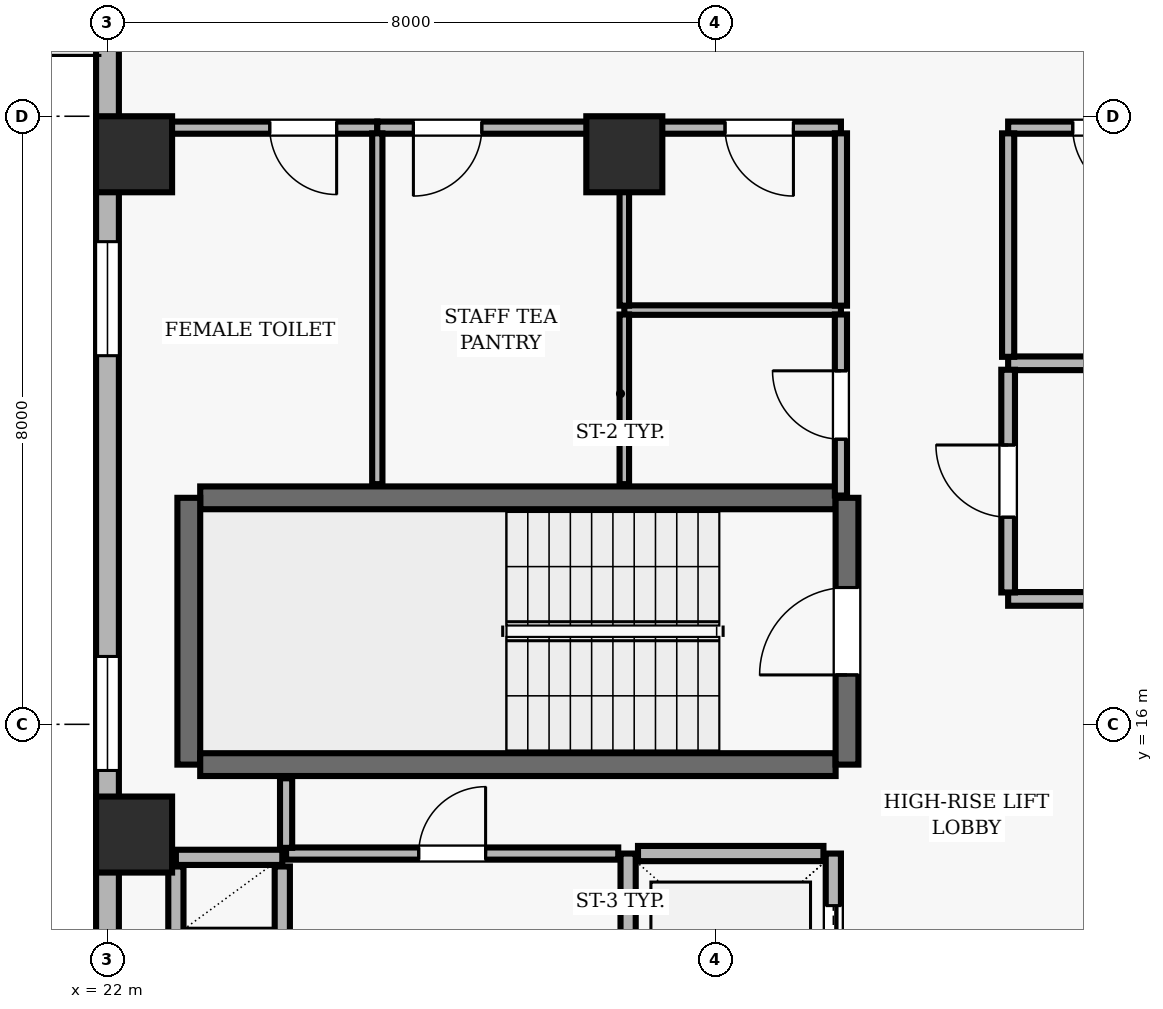
"""IFC4 building model, lengths in metres.
Left out: names, types, materials, properties, quantities, classifications, styles, units other than length and angle.
Written with IfcOpenShell. Run it as: python <this file> out.ifc"""

import sys

from ifc_helpers import new_model, si_unit, direction, frame, frame_2d, origin, origin_2d, place, context, subcontext, project, spatial, rectangle, extrude, element, fill, save


model = new_model("IFC4")
c1 = context("Model", 3, precision=1e-05, world=origin(), true_north=direction((0.0, 1.0)))
c2 = subcontext(c1, "Body", "Model", "MODEL_VIEW")
j1 = project(units=[si_unit("LENGTHUNIT", "METRE"), si_unit("PLANEANGLEUNIT", "RADIAN")], contexts=[c1])
p1 = place(None, origin())
s1 = spatial("IfcSite", under=j1, at=p1, CompositionType="ELEMENT")
p2 = place(p1, origin())
s2 = spatial("IfcBuilding", under=s1, at=p2, CompositionType="ELEMENT")
p3 = place(p2, frame((0.0, 0.0, 203.1)))
s3 = spatial("IfcBuildingStorey", under=s2, at=p3, CompositionType="ELEMENT", Elevation=203.1)
for number, where, z_axis, x_axis in (
    (1, (22.35, 14.55, 0.0), (0.0, 0.0, 1.0), (1.0, 0.0, 0.0)),
    (2, (22.35, 23.5, 0.0), (0.0, 0.0, 1.0), (1.0, 0.0, 0.0)),
    (3, (28.8, 23.5, 0.0), (0.0, 0.0, 1.0), (1.0, 0.0, 0.0)),
):
    element("IfcColumn", number, at=place(p3, frame(where, z_axis=z_axis, x_axis=x_axis)), inside=s3, PredefinedType="COLUMN", context=c2, shape_type="SweptSolid", body=[
        extrude(rectangle(XDim=1.0, YDim=1.0, at=origin_2d()), origin(), (0.0, 0.0, 1.0), 3.9),
    ])
p4 = place(p3, frame((22.0, 40.7, 0.0), z_axis=(0.0, 0.0, 1.0), x_axis=(0.0, -1.0, 0.0)))
e4 = element("IfcWall", 4, at=p4, inside=s3, PredefinedType="SOLIDWALL", context=c2, shape_type="SweptSolid", body=[
    extrude(rectangle(XDim=38.2, YDim=0.3, at=frame_2d((19.1, 0.0))), origin(), (0.0, 0.0, 1.0), 3.69),
])
p5 = place(p4, frame((7.8, 0.0, 0.0)))
e5 = element("IfcOpeningElement", 5, at=p5, cuts=e4, PredefinedType="OPENING", context=c2, shape_type="SweptSolid", body=[
    extrude(rectangle(XDim=1.0, YDim=2.2, at=frame_2d((0.5, 1.1))), frame((0.0, 0.16, 0.0), z_axis=(0.0, -1.0, 0.0), x_axis=(1.0, 0.0, 0.0)), (0.0, 0.0, 1.0), 0.32),
])
p6 = place(p4, frame((1.979, 0.0, 0.9)))
e6 = element("IfcOpeningElement", 6, at=p6, cuts=e4, PredefinedType="OPENING", context=c2, shape_type="SweptSolid", body=[
    extrude(rectangle(XDim=1.5, YDim=1.6, at=frame_2d((0.75, 0.8))), frame((0.0, 0.16, 0.0), z_axis=(0.0, -1.0, 0.0), x_axis=(1.0, 0.0, 0.0)), (0.0, 0.0, 1.0), 0.32),
])
p7 = place(p4, frame((12.443, 0.0, 0.9)))
e7 = element("IfcOpeningElement", 7, at=p7, cuts=e4, PredefinedType="OPENING", context=c2, shape_type="SweptSolid", body=[
    extrude(rectangle(XDim=1.5, YDim=1.6, at=frame_2d((0.75, 0.8))), frame((0.0, 0.16, 0.0), z_axis=(0.0, -1.0, 0.0), x_axis=(1.0, 0.0, 0.0)), (0.0, 0.0, 1.0), 0.32),
])
p8 = place(p4, frame((18.35, 0.0, 0.9)))
e8 = element("IfcOpeningElement", 8, at=p8, cuts=e4, PredefinedType="OPENING", context=c2, shape_type="SweptSolid", body=[
    extrude(rectangle(XDim=1.5, YDim=1.6, at=frame_2d((0.75, 0.8))), frame((0.0, 0.16, 0.0), z_axis=(0.0, -1.0, 0.0), x_axis=(1.0, 0.0, 0.0)), (0.0, 0.0, 1.0), 0.32),
])
p9 = place(p4, frame((23.807, 0.0, 0.9)))
e9 = element("IfcOpeningElement", 9, at=p9, cuts=e4, PredefinedType="OPENING", context=c2, shape_type="SweptSolid", body=[
    extrude(rectangle(XDim=1.5, YDim=1.6, at=frame_2d((0.75, 0.8))), frame((0.0, 0.16, 0.0), z_axis=(0.0, -1.0, 0.0), x_axis=(1.0, 0.0, 0.0)), (0.0, 0.0, 1.0), 0.32),
])
p10 = place(p4, frame((29.264, 0.0, 0.9)))
e10 = element("IfcOpeningElement", 10, at=p10, cuts=e4, PredefinedType="OPENING", context=c2, shape_type="SweptSolid", body=[
    extrude(rectangle(XDim=1.5, YDim=1.6, at=frame_2d((0.75, 0.8))), frame((0.0, 0.16, 0.0), z_axis=(0.0, -1.0, 0.0), x_axis=(1.0, 0.0, 0.0)), (0.0, 0.0, 1.0), 0.32),
])
p11 = place(p3, frame((31.58, 18.98, 0.0), z_axis=(0.0, 0.0, 1.0), x_axis=(-1.0, 0.0, 0.0)))
e11 = element("IfcWall", 11, at=p11, inside=s3, PredefinedType="SHEAR", context=c2, shape_type="SweptSolid", body=[
    extrude(rectangle(XDim=8.36, YDim=0.3, at=frame_2d((4.18, 0.0))), origin(), (0.0, 0.0, 1.0), 3.69),
])
p12 = place(p3, frame((23.07, 18.98, 0.0), z_axis=(0.0, 0.0, 1.0), x_axis=(0.0, -1.0, 0.0)))
e12 = element("IfcWall", 12, at=p12, inside=s3, PredefinedType="SHEAR", context=c2, shape_type="SweptSolid", body=[
    extrude(rectangle(XDim=3.51, YDim=0.3, at=frame_2d((1.755, 0.0))), origin(), (0.0, 0.0, 1.0), 3.69),
])
p13 = place(p3, frame((23.22, 15.47, 0.0), z_axis=(0.0, 0.0, 1.0), x_axis=(1.0, 0.0, 0.0)))
e13 = element("IfcWall", 13, at=p13, inside=s3, PredefinedType="SHEAR", context=c2, shape_type="SweptSolid", body=[
    extrude(rectangle(XDim=8.36, YDim=0.3, at=frame_2d((4.18, 0.0))), origin(), (0.0, 0.0, 1.0), 3.69),
])
p14 = place(p3, frame((31.73, 15.47, 0.0), z_axis=(0.0, 0.0, 1.0), x_axis=(0.0, 1.0, 0.0)))
e14 = element("IfcWall", 14, at=p14, inside=s3, PredefinedType="SHEAR", context=c2, shape_type="SweptSolid", body=[
    extrude(rectangle(XDim=3.51, YDim=0.3, at=frame_2d((1.755, 0.0))), origin(), (0.0, 0.0, 1.0), 3.69),
])
p15 = place(p14, frame((1.18, 0.0, 0.0)))
e15 = element("IfcOpeningElement", 15, at=p15, cuts=e14, PredefinedType="OPENING", context=c2, shape_type="SweptSolid", body=[
    extrude(rectangle(XDim=1.15, YDim=2.15, at=frame_2d((0.575, 1.075))), frame((0.0, 0.16, 0.0), z_axis=(0.0, -1.0, 0.0), x_axis=(1.0, 0.0, 0.0)), (0.0, 0.0, 1.0), 0.32),
])
p16 = place(p3, frame((28.85, 14.3, 0.0), z_axis=(0.0, 0.0, 1.0), x_axis=(0.0, -1.0, 0.0)))
e16 = element("IfcWall", 16, at=p16, inside=s3, PredefinedType="SOLIDWALL", context=c2, shape_type="SweptSolid", body=[
    extrude(rectangle(XDim=2.37, YDim=0.2, at=frame_2d((1.185, 0.0))), origin(), (0.0, 0.0, 1.0), 3.69),
])
p17 = place(p3, frame((31.55, 11.93, 0.0), z_axis=(0.0, 0.0, 1.0), x_axis=(0.0, 1.0, 0.0)))
e17 = element("IfcWall", 17, at=p17, inside=s3, PredefinedType="SOLIDWALL", context=c2, shape_type="SweptSolid", body=[
    extrude(rectangle(XDim=2.37, YDim=0.2, at=frame_2d((1.185, 0.0))), origin(), (0.0, 0.0, 1.0), 3.69),
])
p18 = place(p17, frame((0.685, 0.0, 0.0)))
e18 = element("IfcOpeningElement", 18, at=p18, cuts=e17, PredefinedType="OPENING", context=c2, shape_type="SweptSolid", body=[
    extrude(rectangle(XDim=1.0, YDim=2.1, at=frame_2d((0.5, 1.05))), frame((0.0, 0.11, 0.0), z_axis=(0.0, -1.0, 0.0), x_axis=(1.0, 0.0, 0.0)), (0.0, 0.0, 1.0), 0.22),
])
p19 = place(p3, frame((31.42, 14.3, 0.0), z_axis=(0.0, 0.0, 1.0), x_axis=(-1.0, 0.0, 0.0)))
e19 = element("IfcWall", 19, at=p19, inside=s3, PredefinedType="SOLIDWALL", context=c2, shape_type="SweptSolid", body=[
    extrude(rectangle(XDim=2.44, YDim=0.2, at=frame_2d((1.22, 0.0))), origin(), (0.0, 0.0, 1.0), 3.69),
])
p20 = place(p3, frame((22.9, 14.25, 0.0), z_axis=(0.0, 0.0, 1.0), x_axis=(1.0, 0.0, 0.0)))
e20 = element("IfcWall", 20, at=p20, inside=s3, PredefinedType="SOLIDWALL", context=c2, shape_type="SweptSolid", body=[
    extrude(rectangle(XDim=1.4, YDim=0.2, at=frame_2d((0.7, 0.0))), origin(), (0.0, 0.0, 1.0), 3.69),
])
for number, where, z_axis, x_axis in (
    (21, (24.3, 12.3, 0.0), (0.0, 0.0, 1.0), (0.0, 1.0, 0.0)),
    (22, (22.9, 12.3, 0.0), (0.0, 0.0, 1.0), (0.0, 1.0, 0.0)),
):
    element("IfcWall", number, at=place(p3, frame(where, z_axis=z_axis, x_axis=x_axis)), inside=s3, PredefinedType="SOLIDWALL", context=c2, shape_type="SweptSolid", body=[
        extrude(rectangle(XDim=1.83, YDim=0.2, at=frame_2d((0.915, 0.0))), origin(), (0.0, 0.0, 1.0), 3.69),
    ])
p21 = place(p3, frame((24.35, 14.3, 0.0), z_axis=(0.0, 0.0, 1.0), x_axis=(1.0, 0.0, 0.0)))
e23 = element("IfcWall", 23, at=p21, inside=s3, PredefinedType="PARTITIONING", context=c2, shape_type="SweptSolid", body=[
    extrude(rectangle(XDim=4.37, YDim=0.16, at=frame_2d((2.185, 0.0))), origin(), (0.0, 0.0, 1.0), 3.69),
])
p22 = place(p21, frame((1.745, 0.0, 0.0)))
e24 = element("IfcOpeningElement", 24, at=p22, cuts=e23, PredefinedType="OPENING", context=c2, shape_type="SweptSolid", body=[
    extrude(rectangle(XDim=0.88, YDim=2.1, at=frame_2d((0.44, 1.05))), frame((0.0, 0.09, 0.0), z_axis=(0.0, -1.0, 0.0), x_axis=(1.0, 0.0, 0.0)), (0.0, 0.0, 1.0), 0.18),
])
p23 = place(p3, frame((25.55, 23.85, 0.0), z_axis=(0.0, 0.0, 1.0), x_axis=(-1.0, 0.0, 0.0)))
e25 = element("IfcWall", 25, at=p23, inside=s3, PredefinedType="PARTITIONING", context=c2, shape_type="SweptSolid", body=[
    extrude(rectangle(XDim=3.35, YDim=0.16, at=frame_2d((1.675, 0.0))), origin(), (0.0, 0.0, 1.0), 3.146),
])
p24 = place(p23, frame((0.535, 0.0, 0.0)))
e26 = element("IfcOpeningElement", 26, at=p24, cuts=e25, PredefinedType="OPENING", context=c2, shape_type="SweptSolid", body=[
    extrude(rectangle(XDim=0.88, YDim=2.1, at=frame_2d((0.44, 1.05))), frame((0.0, 0.09, 0.0), z_axis=(0.0, -1.0, 0.0), x_axis=(1.0, 0.0, 0.0)), (0.0, 0.0, 1.0), 0.18),
])
p25 = place(p3, frame((28.8, 23.85, 0.0), z_axis=(0.0, 0.0, 1.0), x_axis=(-1.0, 0.0, 0.0)))
e27 = element("IfcWall", 27, at=p25, inside=s3, PredefinedType="PARTITIONING", context=c2, shape_type="SweptSolid", body=[
    extrude(rectangle(XDim=3.25, YDim=0.16, at=frame_2d((1.625, 0.0))), origin(), (0.0, 0.0, 1.0), 3.146),
])
p26 = place(p25, frame((1.875, 0.0, 0.0)))
e28 = element("IfcOpeningElement", 28, at=p26, cuts=e27, PredefinedType="OPENING", context=c2, shape_type="SweptSolid", body=[
    extrude(rectangle(XDim=0.9, YDim=2.1, at=frame_2d((0.45, 1.05))), frame((0.0, 0.09, 0.0), z_axis=(0.0, -1.0, 0.0), x_axis=(1.0, 0.0, 0.0)), (0.0, 0.0, 1.0), 0.18),
])
p27 = place(p3, frame((31.65, 21.45, 0.0), z_axis=(0.0, 0.0, 1.0), x_axis=(-1.0, 0.0, 0.0)))
e29 = element("IfcWall", 29, at=p27, inside=s3, PredefinedType="PARTITIONING", context=c2, shape_type="SweptSolid", body=[
    extrude(rectangle(XDim=2.85, YDim=0.125, at=frame_2d((1.425, 0.0))), origin(), (0.0, 0.0, 1.0), 3.69),
])
p28 = place(p3, frame((31.65, 23.85, 0.0), z_axis=(0.0, 0.0, 1.0), x_axis=(-1.0, 0.0, 0.0)))
e30 = element("IfcWall", 30, at=p28, inside=s3, PredefinedType="PARTITIONING", context=c2, shape_type="SweptSolid", body=[
    extrude(rectangle(XDim=2.85, YDim=0.16, at=frame_2d((1.425, 0.0))), origin(), (0.0, 0.0, 1.0), 3.146),
])
p29 = place(p28, frame((0.625, 0.0, 0.0)))
e31 = element("IfcOpeningElement", 31, at=p29, cuts=e30, PredefinedType="OPENING", context=c2, shape_type="SweptSolid", body=[
    extrude(rectangle(XDim=0.9, YDim=2.1, at=frame_2d((0.45, 1.05))), frame((0.0, 0.09, 0.0), z_axis=(0.0, -1.0, 0.0), x_axis=(1.0, 0.0, 0.0)), (0.0, 0.0, 1.0), 0.18),
])
p30 = place(p3, frame((33.85, 17.65, 0.0), z_axis=(0.0, 0.0, 1.0), x_axis=(1.0, 0.0, 0.0)))
e32 = element("IfcWall", 32, at=p30, inside=s3, PredefinedType="PARTITIONING", context=c2, shape_type="SweptSolid", body=[
    extrude(rectangle(XDim=1.3, YDim=0.18, at=frame_2d((0.65, 0.0))), origin(), (0.0, 0.0, 1.0), 3.69),
])
p31 = place(p3, frame((37.85, 20.75, 0.0), z_axis=(0.0, 0.0, 1.0), x_axis=(-1.0, 0.0, 0.0)))
e33 = element("IfcWall", 33, at=p31, inside=s3, PredefinedType="PARTITIONING", context=c2, shape_type="SweptSolid", body=[
    extrude(rectangle(XDim=4.0, YDim=0.18, at=frame_2d((2.0, 0.0))), origin(), (0.0, 0.0, 1.0), 3.69),
])
p32 = place(p3, frame((37.85, 23.85, 0.0), z_axis=(0.0, 0.0, 1.0), x_axis=(-1.0, 0.0, 0.0)))
e34 = element("IfcWall", 34, at=p32, inside=s3, PredefinedType="PARTITIONING", context=c2, shape_type="SweptSolid", body=[
    extrude(rectangle(XDim=4.0, YDim=0.16, at=frame_2d((2.0, 0.0))), origin(), (0.0, 0.0, 1.0), 3.146),
])
p33 = place(p32, frame((2.25, 0.0, 0.0)))
e35 = element("IfcOpeningElement", 35, at=p33, cuts=e34, PredefinedType="OPENING", context=c2, shape_type="SweptSolid", body=[
    extrude(rectangle(XDim=0.9, YDim=2.1, at=frame_2d((0.45, 1.05))), frame((0.0, 0.09, 0.0), z_axis=(0.0, -1.0, 0.0), x_axis=(1.0, 0.0, 0.0)), (0.0, 0.0, 1.0), 0.18),
])
p34 = place(p3, frame((24.35, 15.29, 0.0), z_axis=(0.0, 0.0, 1.0), x_axis=(0.0, -1.0, 0.0)))
e36 = element("IfcWall", 36, at=p34, inside=s3, PredefinedType="PARTITIONING", context=c2, shape_type="SweptSolid", body=[
    extrude(rectangle(XDim=0.915, YDim=0.16, at=frame_2d((0.458, 0.0))), origin(), (0.0, 0.0, 1.0), 3.69),
])
p35 = place(p3, frame((25.55, 19.16, 0.0), z_axis=(0.0, 0.0, 1.0), x_axis=(0.0, 1.0, 0.0)))
e37 = element("IfcWall", 37, at=p35, inside=s3, PredefinedType="PARTITIONING", context=c2, shape_type="SweptSolid", body=[
    extrude(rectangle(XDim=4.615, YDim=0.135, at=frame_2d((2.308, 0.0))), origin(), (0.0, 0.0, 1.0), 3.69),
])
p36 = place(p3, frame((28.8, 21.392, 0.0), z_axis=(0.0, 0.0, 1.0), x_axis=(0.0, -1.0, 0.0)))
e38 = element("IfcWall", 38, at=p36, inside=s3, PredefinedType="PARTITIONING", context=c2, shape_type="SweptSolid", body=[
    extrude(rectangle(XDim=2.232, YDim=0.125, at=frame_2d((1.116, 0.0))), origin(), (0.0, 0.0, 1.0), 3.69),
])
p37 = place(p3, frame((28.8, 23.775, 0.0), z_axis=(0.0, 0.0, 1.0), x_axis=(0.0, -1.0, 0.0)))
e39 = element("IfcWall", 39, at=p37, inside=s3, PredefinedType="PARTITIONING", context=c2, shape_type="SweptSolid", body=[
    extrude(rectangle(XDim=2.267, YDim=0.125, at=frame_2d((1.133, 0.0))), origin(), (0.0, 0.0, 1.0), 3.69),
])
p38 = place(p3, frame((31.65, 19.01, 0.0), z_axis=(0.0, 0.0, 1.0), x_axis=(0.0, 1.0, 0.0)))
e40 = element("IfcWall", 40, at=p38, inside=s3, PredefinedType="PARTITIONING", context=c2, shape_type="SweptSolid", body=[
    extrude(rectangle(XDim=2.382, YDim=0.16, at=frame_2d((1.191, 0.0))), origin(), (0.0, 0.0, 1.0), 3.69),
])
p39 = place(p38, frame((0.741, 0.0, 0.0)))
e41 = element("IfcOpeningElement", 41, at=p39, cuts=e40, PredefinedType="OPENING", context=c2, shape_type="SweptSolid", body=[
    extrude(rectangle(XDim=0.9, YDim=2.1, at=frame_2d((0.45, 1.05))), frame((0.0, 0.09, 0.0), z_axis=(0.0, -1.0, 0.0), x_axis=(1.0, 0.0, 0.0)), (0.0, 0.0, 1.0), 0.18),
])
p40 = place(p3, frame((31.65, 23.775, 0.0), z_axis=(0.0, 0.0, 1.0), x_axis=(0.0, -1.0, 0.0)))
e42 = element("IfcWall", 42, at=p40, inside=s3, PredefinedType="PARTITIONING", context=c2, shape_type="SweptSolid", body=[
    extrude(rectangle(XDim=2.267, YDim=0.16, at=frame_2d((1.133, 0.0))), origin(), (0.0, 0.0, 1.0), 3.69),
])
p41 = place(p3, frame((33.85, 17.735, 0.0), z_axis=(0.0, 0.0, 1.0), x_axis=(0.0, 1.0, 0.0)))
e43 = element("IfcWall", 43, at=p41, inside=s3, PredefinedType="PARTITIONING", context=c2, shape_type="SweptSolid", body=[
    extrude(rectangle(XDim=2.93, YDim=0.18, at=frame_2d((1.465, 0.0))), origin(), (0.0, 0.0, 1.0), 3.69),
])
p42 = place(p41, frame((0.99, 0.0, 0.0)))
e44 = element("IfcOpeningElement", 44, at=p42, cuts=e43, PredefinedType="OPENING", context=c2, shape_type="SweptSolid", body=[
    extrude(rectangle(XDim=0.95, YDim=2.1, at=frame_2d((0.475, 1.05))), frame((0.0, 0.1, 0.0), z_axis=(0.0, -1.0, 0.0), x_axis=(1.0, 0.0, 0.0)), (0.0, 0.0, 1.0), 0.2),
])
p43 = place(p3, frame((33.85, 20.835, 0.0), z_axis=(0.0, 0.0, 1.0), x_axis=(0.0, 1.0, 0.0)))
e45 = element("IfcWall", 45, at=p43, inside=s3, PredefinedType="PARTITIONING", context=c2, shape_type="SweptSolid", body=[
    extrude(rectangle(XDim=2.94, YDim=0.16, at=frame_2d((1.47, 0.0))), origin(), (0.0, 0.0, 1.0), 3.69),
])
p44 = place(p8, origin())
e46 = element("IfcWindow", 46, at=p44, inside=s3, PartitioningType="SINGLE_PANEL", PredefinedType="WINDOW", context=c2, shape_type="SweptSolid", body=[
    extrude(rectangle(XDim=1.5, YDim=1.6, at=frame_2d((0.75, 0.8))), frame((0.0, 0.03, 0.0), z_axis=(0.0, -1.0, 0.0), x_axis=(1.0, 0.0, 0.0)), (0.0, 0.0, 1.0), 0.06),
])
fill(e8, e46)
p45 = place(p9, origin())
e47 = element("IfcWindow", 47, at=p45, inside=s3, PartitioningType="SINGLE_PANEL", PredefinedType="WINDOW", context=c2, shape_type="SweptSolid", body=[
    extrude(rectangle(XDim=1.5, YDim=1.6, at=frame_2d((0.75, 0.8))), frame((0.0, 0.03, 0.0), z_axis=(0.0, -1.0, 0.0), x_axis=(1.0, 0.0, 0.0)), (0.0, 0.0, 1.0), 0.06),
])
fill(e9, e47)
p46 = place(p15, origin())
e48 = element("IfcDoor", 48, at=p46, inside=s3, OperationType="SINGLE_SWING_LEFT", PredefinedType="DOOR", context=c2, shape_type="SweptSolid", body=[
    extrude(rectangle(XDim=1.15, YDim=2.15, at=frame_2d((0.575, 1.075))), frame((0.0, 0.025, 0.0), z_axis=(0.0, -1.0, 0.0), x_axis=(1.0, 0.0, 0.0)), (0.0, 0.0, 1.0), 0.05),
])
fill(e15, e48)
p47 = place(p18, origin())
e49 = element("IfcDoor", 49, at=p47, inside=s3, OperationType="DOUBLE_DOOR_SLIDING", PredefinedType="DOOR", context=c2, shape_type="SweptSolid", body=[
    extrude(rectangle(XDim=1.0, YDim=2.1, at=frame_2d((0.5, 1.05))), frame((0.0, 0.025, 0.0), z_axis=(0.0, -1.0, 0.0), x_axis=(1.0, 0.0, 0.0)), (0.0, 0.0, 1.0), 0.05),
])
fill(e18, e49)
p48 = place(p42, origin())
e50 = element("IfcDoor", 50, at=p48, inside=s3, OperationType="SINGLE_SWING_RIGHT", PredefinedType="DOOR", context=c2, shape_type="SweptSolid", body=[
    extrude(rectangle(XDim=0.95, YDim=2.1, at=frame_2d((0.475, 1.05))), frame((0.0, 0.025, 0.0), z_axis=(0.0, -1.0, 0.0), x_axis=(1.0, 0.0, 0.0)), (0.0, 0.0, 1.0), 0.05),
])
fill(e44, e50)
p49 = place(p33, origin())
e51 = element("IfcDoor", 51, at=p49, inside=s3, OperationType="SINGLE_SWING_LEFT", PredefinedType="DOOR", context=c2, shape_type="SweptSolid", body=[
    extrude(rectangle(XDim=0.9, YDim=2.1, at=frame_2d((0.45, 1.05))), frame((0.0, 0.025, 0.0), z_axis=(0.0, -1.0, 0.0), x_axis=(1.0, 0.0, 0.0)), (0.0, 0.0, 1.0), 0.05),
])
fill(e35, e51)
p50 = place(p39, origin())
e52 = element("IfcDoor", 52, at=p50, inside=s3, OperationType="SINGLE_SWING_RIGHT", PredefinedType="DOOR", context=c2, shape_type="SweptSolid", body=[
    extrude(rectangle(XDim=0.9, YDim=2.1, at=frame_2d((0.45, 1.05))), frame((0.0, 0.025, 0.0), z_axis=(0.0, -1.0, 0.0), x_axis=(1.0, 0.0, 0.0)), (0.0, 0.0, 1.0), 0.05),
])
fill(e41, e52)
p51 = place(p29, origin())
e53 = element("IfcDoor", 53, at=p51, inside=s3, OperationType="SINGLE_SWING_LEFT", PredefinedType="DOOR", context=c2, shape_type="SweptSolid", body=[
    extrude(rectangle(XDim=0.9, YDim=2.1, at=frame_2d((0.45, 1.05))), frame((0.0, 0.025, 0.0), z_axis=(0.0, -1.0, 0.0), x_axis=(1.0, 0.0, 0.0)), (0.0, 0.0, 1.0), 0.05),
])
fill(e31, e53)
p52 = place(p22, origin())
e54 = element("IfcDoor", 54, at=p52, inside=s3, OperationType="SINGLE_SWING_RIGHT", PredefinedType="DOOR", context=c2, shape_type="SweptSolid", body=[
    extrude(rectangle(XDim=0.88, YDim=2.1, at=frame_2d((0.44, 1.05))), frame((0.0, 0.025, 0.0), z_axis=(0.0, -1.0, 0.0), x_axis=(1.0, 0.0, 0.0)), (0.0, 0.0, 1.0), 0.05),
])
fill(e24, e54)
p53 = place(p24, origin())
e55 = element("IfcDoor", 55, at=p53, inside=s3, OperationType="SINGLE_SWING_LEFT", PredefinedType="DOOR", context=c2, shape_type="SweptSolid", body=[
    extrude(rectangle(XDim=0.88, YDim=2.1, at=frame_2d((0.44, 1.05))), frame((0.0, 0.025, 0.0), z_axis=(0.0, -1.0, 0.0), x_axis=(1.0, 0.0, 0.0)), (0.0, 0.0, 1.0), 0.05),
])
fill(e26, e55)
p54 = place(p26, origin())
e56 = element("IfcDoor", 56, at=p54, inside=s3, OperationType="SINGLE_SWING_RIGHT", PredefinedType="DOOR", context=c2, shape_type="SweptSolid", body=[
    extrude(rectangle(XDim=0.9, YDim=2.1, at=frame_2d((0.45, 1.05))), frame((0.0, 0.025, 0.0), z_axis=(0.0, -1.0, 0.0), x_axis=(1.0, 0.0, 0.0)), (0.0, 0.0, 1.0), 0.05),
])
fill(e28, e56)
save(model, sys.argv[1])
